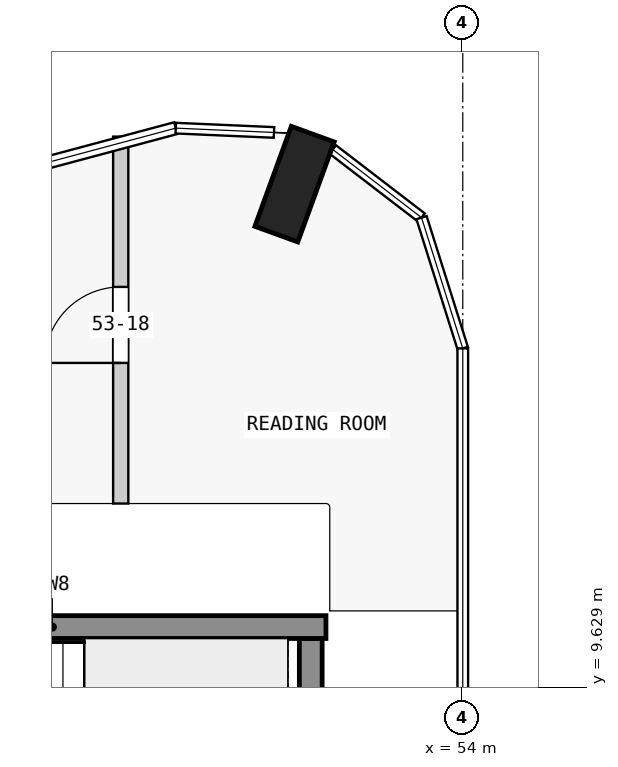
"""IFC4 building model, lengths in metres.
Left out: names, types, materials, properties, quantities, classifications, styles, units other than length and angle.
Written with IfcOpenShell. Run it as: python <this file> out.ifc"""

import sys

from ifc_helpers import new_model, si_unit, direction, frame, frame_2d, origin, origin_2d, place, context, subcontext, project, spatial, rectangle, extrude, element, fill, save


model = new_model("IFC4")
c1 = context("Model", 3, precision=1e-05, world=origin(), true_north=direction((0.0, 1.0)))
c2 = subcontext(c1, "Body", "Model", "MODEL_VIEW")
j1 = project(units=[si_unit("LENGTHUNIT", "METRE"), si_unit("PLANEANGLEUNIT", "RADIAN")], contexts=[c1])
p1 = place(None, origin())
s1 = spatial("IfcSite", under=j1, at=p1, CompositionType="ELEMENT")
p2 = place(p1, origin())
s2 = spatial("IfcBuilding", under=s1, at=p2, CompositionType="ELEMENT")
p3 = place(p2, frame((0.0, 0.0, 204.9)))
s3 = spatial("IfcBuildingStorey", under=s2, at=p3, CompositionType="ELEMENT", Elevation=204.9)
p4 = place(p3, frame((51.787, 16.252, 0.0), z_axis=(0.0, 0.0, 1.0), x_axis=(-0.939664280925, 0.342097996418, 0.0)))
e1 = element("IfcColumn", 1, at=p4, inside=s3, PredefinedType="COLUMN", context=c2, shape_type="SweptSolid", body=[
    extrude(rectangle(XDim=0.6, YDim=1.4, at=origin_2d()), origin(), (0.0, 0.0, 1.0), 3.5),
])
p5 = place(p3, frame((52.0, 7.725, 0.0), z_axis=(0.0, 0.0, 1.0), x_axis=(0.0, 1.0, 0.0)))
e2 = element("IfcWall", 2, at=p5, inside=s3, PredefinedType="SHEAR", context=c2, shape_type="SweptSolid", body=[
    extrude(rectangle(XDim=2.55, YDim=0.3, at=frame_2d((1.275, 0.0))), origin(), (0.0, 0.0, 1.0), 3.5),
])
p6 = place(p3, frame((45.0, 10.425, 0.0), z_axis=(0.0, 0.0, 1.0), x_axis=(1.0, 0.0, 0.0)))
e3 = element("IfcWall", 3, at=p6, inside=s3, PredefinedType="SHEAR", context=c2, shape_type="SweptSolid", body=[
    extrude(rectangle(XDim=7.2, YDim=0.3, at=frame_2d((3.6, 0.0))), origin(), (0.0, 0.0, 1.0), 3.5),
])
p7 = place(p3, frame((49.5, 12.05, 0.0), z_axis=(0.0, 0.0, 1.0), x_axis=(0.0, 1.0, 0.0)))
e4 = element("IfcWall", 4, at=p7, inside=s3, PredefinedType="PARTITIONING", context=c2, shape_type="SweptSolid", body=[
    extrude(rectangle(XDim=4.828, YDim=0.2, at=frame_2d((2.414, 0.0))), origin(), (0.0, 0.0, 1.0), 3.25),
])
p8 = place(p7, frame((1.85, 0.0, 0.0)))
e5 = element("IfcOpeningElement", 5, at=p8, cuts=e4, PredefinedType="OPENING", context=c2, shape_type="SweptSolid", body=[
    extrude(rectangle(XDim=1.0, YDim=2.1, at=frame_2d((0.5, 1.05))), frame((0.0, 0.11, 0.0), z_axis=(0.0, -1.0, 0.0), x_axis=(1.0, 0.0, 0.0)), (0.0, 0.0, 1.0), 0.22),
])
p9 = place(p8, origin())
e6 = element("IfcDoor", 6, at=p9, inside=s3, OperationType="SINGLE_SWING_LEFT", PredefinedType="DOOR", context=c2, shape_type="SweptSolid", body=[
    extrude(rectangle(XDim=1.0, YDim=2.1, at=frame_2d((0.5, 1.05))), frame((0.0, 0.025, 0.0), z_axis=(0.0, -1.0, 0.0), x_axis=(1.0, 0.0, 0.0)), (0.0, 0.0, 1.0), 0.05),
])
fill(e5, e6)
save(model, sys.argv[1])
